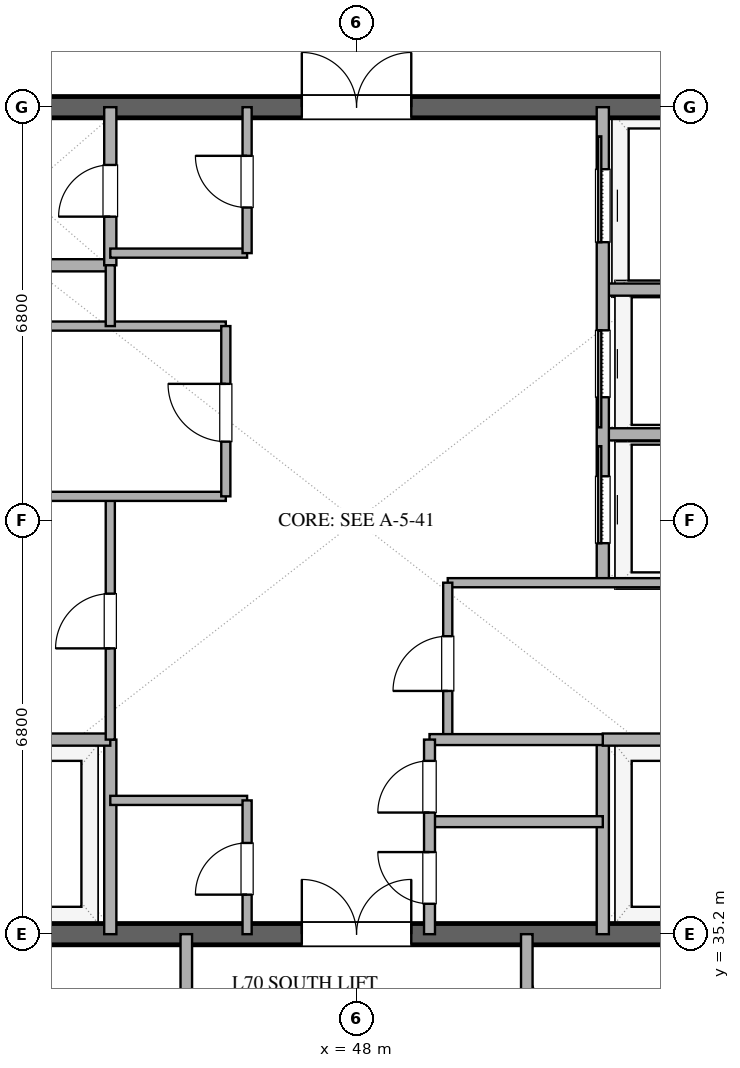
"""IFC4 building model, lengths in metres.
Left out: names, types, materials, properties, quantities, classifications, styles, units other than length and angle.
Written with IfcOpenShell. Run it as: python <this file> out.ifc"""

import sys

from ifc_helpers import new_model, si_unit, direction, frame, frame_2d, origin, place, context, subcontext, project, spatial, rectangle, extrude, element, fill, save


model = new_model("IFC4")
c1 = context("Model", 3, precision=1e-05, world=origin(), true_north=direction((0.0, 1.0)))
c2 = subcontext(c1, "Body", "Model", "MODEL_VIEW")
j1 = project(units=[si_unit("LENGTHUNIT", "METRE"), si_unit("PLANEANGLEUNIT", "RADIAN")], contexts=[c1])
p1 = place(None, origin())
s1 = spatial("IfcSite", under=j1, at=p1, CompositionType="ELEMENT")
p2 = place(p1, origin())
s2 = spatial("IfcBuilding", under=s1, at=p2, CompositionType="ELEMENT")
p3 = place(p2, frame((0.0, 0.0, 273.0)))
s3 = spatial("IfcBuildingStorey", under=s2, at=p3, CompositionType="ELEMENT", Elevation=273.0)
p4 = place(p3, frame((41.0, 35.2, 0.0), z_axis=(0.0, 0.0, 1.0), x_axis=(1.0, 0.0, 0.0)))
e1 = element("IfcWall", 1, at=p4, inside=s3, PredefinedType="SHEAR", context=c2, shape_type="SweptSolid", body=[
    extrude(rectangle(XDim=14.0, YDim=0.35, at=frame_2d((7.0, 0.0))), origin(), (0.0, 0.0, 1.0), 3.37),
])
p5 = place(p4, frame((6.1, 0.0, 0.0)))
e2 = element("IfcOpeningElement", 2, at=p5, cuts=e1, PredefinedType="OPENING", context=c2, shape_type="SweptSolid", body=[
    extrude(rectangle(XDim=1.8, YDim=2.25, at=frame_2d((0.9, 1.125))), frame((0.0, 0.185, 0.0), z_axis=(0.0, -1.0, 0.0), x_axis=(1.0, 0.0, 0.0)), (0.0, 0.0, 1.0), 0.37),
])
p6 = place(p3, frame((41.0, 48.8, 0.0), z_axis=(0.0, 0.0, 1.0), x_axis=(1.0, 0.0, 0.0)))
e3 = element("IfcWall", 3, at=p6, inside=s3, PredefinedType="SHEAR", context=c2, shape_type="SweptSolid", body=[
    extrude(rectangle(XDim=14.0, YDim=0.35, at=frame_2d((7.0, 0.0))), origin(), (0.0, 0.0, 1.0), 3.37),
])
p7 = place(p6, frame((6.1, 0.0, 0.0)))
e4 = element("IfcOpeningElement", 4, at=p7, cuts=e3, PredefinedType="OPENING", context=c2, shape_type="SweptSolid", body=[
    extrude(rectangle(XDim=1.8, YDim=2.25, at=frame_2d((0.9, 1.125))), frame((0.0, 0.185, 0.0), z_axis=(0.0, -1.0, 0.0), x_axis=(1.0, 0.0, 0.0)), (0.0, 0.0, 1.0), 0.37),
])
p8 = place(p3, frame((43.95, 35.2, 0.0), z_axis=(0.0, 0.0, 1.0), x_axis=(0.0, 1.0, 0.0)))
e5 = element("IfcWall", 5, at=p8, inside=s3, PredefinedType="SOLIDWALL", context=c2, shape_type="SweptSolid", body=[
    extrude(rectangle(XDim=3.2, YDim=0.2, at=frame_2d((1.6, 0.0))), origin(), (0.0, 0.0, 1.0), 2.73),
])
p9 = place(p3, frame((41.0, 38.4, 0.0), z_axis=(0.0, 0.0, 1.0), x_axis=(1.0, 0.0, 0.0)))
e6 = element("IfcWall", 6, at=p9, inside=s3, PredefinedType="SOLIDWALL", context=c2, shape_type="SweptSolid", body=[
    extrude(rectangle(XDim=2.95, YDim=0.2, at=frame_2d((1.475, 0.0))), origin(), (0.0, 0.0, 1.0), 2.73),
])
p10 = place(p3, frame((52.05, 35.2, 0.0), z_axis=(0.0, 0.0, 1.0), x_axis=(0.0, 1.0, 0.0)))
e7 = element("IfcWall", 7, at=p10, inside=s3, PredefinedType="SOLIDWALL", context=c2, shape_type="SweptSolid", body=[
    extrude(rectangle(XDim=3.2, YDim=0.2, at=frame_2d((1.6, 0.0))), origin(), (0.0, 0.0, 1.0), 2.73),
])
for number, where, z_axis, x_axis in (
    (8, (52.05, 38.4, 0.0), (0.0, 0.0, 1.0), (1.0, 0.0, 0.0)),
    (9, (41.0, 46.2, 0.0), (0.0, 0.0, 1.0), (1.0, 0.0, 0.0)),
):
    element("IfcWall", number, at=place(p3, frame(where, z_axis=z_axis, x_axis=x_axis)), inside=s3, PredefinedType="SOLIDWALL", context=c2, shape_type="SweptSolid", body=[
        extrude(rectangle(XDim=2.95, YDim=0.2, at=frame_2d((1.475, 0.0))), origin(), (0.0, 0.0, 1.0), 2.73),
    ])
p11 = place(p3, frame((43.95, 46.2, 0.0), z_axis=(0.0, 0.0, 1.0), x_axis=(0.0, 1.0, 0.0)))
e10 = element("IfcWall", 10, at=p11, inside=s3, PredefinedType="SOLIDWALL", context=c2, shape_type="SweptSolid", body=[
    extrude(rectangle(XDim=2.6, YDim=0.2, at=frame_2d((1.3, 0.0))), origin(), (0.0, 0.0, 1.0), 2.73),
])
p12 = place(p11, frame((0.8, 0.0, 0.0)))
e11 = element("IfcOpeningElement", 11, at=p12, cuts=e10, PredefinedType="OPENING", context=c2, shape_type="SweptSolid", body=[
    extrude(rectangle(XDim=0.85, YDim=2.15, at=frame_2d((0.425, 1.075))), frame((0.0, 0.11, 0.0), z_axis=(0.0, -1.0, 0.0), x_axis=(1.0, 0.0, 0.0)), (0.0, 0.0, 1.0), 0.22),
])
p13 = place(p3, frame((43.95, 38.4, 0.0), z_axis=(0.0, 0.0, 1.0), x_axis=(0.0, 1.0, 0.0)))
e12 = element("IfcWall", 12, at=p13, inside=s3, PredefinedType="PARTITIONING", context=c2, shape_type="SweptSolid", body=[
    extrude(rectangle(XDim=4.0, YDim=0.15, at=frame_2d((2.0, 0.0))), origin(), (0.0, 0.0, 1.0), 2.73),
])
p14 = place(p13, frame((1.5, 0.0, 0.0)))
e13 = element("IfcOpeningElement", 13, at=p14, cuts=e12, PredefinedType="OPENING", context=c2, shape_type="SweptSolid", body=[
    extrude(rectangle(XDim=0.9, YDim=2.15, at=frame_2d((0.45, 1.075))), frame((0.0, 0.085, 0.0), z_axis=(0.0, -1.0, 0.0), x_axis=(1.0, 0.0, 0.0)), (0.0, 0.0, 1.0), 0.17),
])
for number, where, z_axis, x_axis in (
    (14, (41.0, 42.4, 0.0), (0.0, 0.0, 1.0), (1.0, 0.0, 0.0)),
    (15, (41.0, 45.2, 0.0), (0.0, 0.0, 1.0), (1.0, 0.0, 0.0)),
):
    element("IfcWall", number, at=place(p3, frame(where, z_axis=z_axis, x_axis=x_axis)), inside=s3, PredefinedType="PARTITIONING", context=c2, shape_type="SweptSolid", body=[
        extrude(rectangle(XDim=4.85, YDim=0.15, at=frame_2d((2.425, 0.0))), origin(), (0.0, 0.0, 1.0), 2.73),
    ])
p15 = place(p3, frame((43.95, 45.2, 0.0), z_axis=(0.0, 0.0, 1.0), x_axis=(0.0, 1.0, 0.0)))
e16 = element("IfcWall", 16, at=p15, inside=s3, PredefinedType="PARTITIONING", context=c2, shape_type="SweptSolid", body=[
    extrude(rectangle(XDim=1.0, YDim=0.15, at=frame_2d((0.5, 0.0))), origin(), (0.0, 0.0, 1.0), 2.73),
])
p16 = place(p3, frame((45.85, 42.4, 0.0), z_axis=(0.0, 0.0, 1.0), x_axis=(0.0, 1.0, 0.0)))
e17 = element("IfcWall", 17, at=p16, inside=s3, PredefinedType="PARTITIONING", context=c2, shape_type="SweptSolid", body=[
    extrude(rectangle(XDim=2.8, YDim=0.15, at=frame_2d((1.4, 0.0))), origin(), (0.0, 0.0, 1.0), 2.73),
])
p17 = place(p16, frame((0.9, 0.0, 0.0)))
e18 = element("IfcOpeningElement", 18, at=p17, cuts=e17, PredefinedType="OPENING", context=c2, shape_type="SweptSolid", body=[
    extrude(rectangle(XDim=0.95, YDim=2.15, at=frame_2d((0.475, 1.075))), frame((0.0, 0.085, 0.0), z_axis=(0.0, -1.0, 0.0), x_axis=(1.0, 0.0, 0.0)), (0.0, 0.0, 1.0), 0.17),
])
for number, where, z_axis, x_axis in (
    (19, (52.05, 43.42, 0.0), (0.0, 0.0, 1.0), (1.0, 0.0, 0.0)),
    (20, (52.05, 45.8, 0.0), (0.0, 0.0, 1.0), (1.0, 0.0, 0.0)),
):
    element("IfcWall", number, at=place(p3, frame(where, z_axis=z_axis, x_axis=x_axis)), inside=s3, PredefinedType="SOLIDWALL", context=c2, shape_type="SweptSolid", body=[
        extrude(rectangle(XDim=2.95, YDim=0.2, at=frame_2d((1.475, 0.0))), origin(), (0.0, 0.0, 1.0), 2.73),
    ])
p18 = place(p3, frame((52.05, 40.98, 0.0), z_axis=(0.0, 0.0, 1.0), x_axis=(0.0, 1.0, 0.0)))
e21 = element("IfcWall", 21, at=p18, inside=s3, PredefinedType="SOLIDWALL", context=c2, shape_type="SweptSolid", body=[
    extrude(rectangle(XDim=7.82, YDim=0.2, at=frame_2d((3.91, 0.0))), origin(), (0.0, 0.0, 1.0), 2.73),
])
p19 = place(p18, frame((0.65, 0.0, 0.0)))
e22 = element("IfcOpeningElement", 22, at=p19, cuts=e21, PredefinedType="OPENING", context=c2, shape_type="SweptSolid", body=[
    extrude(rectangle(XDim=1.1, YDim=2.2, at=frame_2d((0.55, 1.1))), frame((0.0, 0.11, 0.0), z_axis=(0.0, -1.0, 0.0), x_axis=(1.0, 0.0, 0.0)), (0.0, 0.0, 1.0), 0.22),
])
p20 = place(p18, frame((3.05, 0.0, 0.0)))
e23 = element("IfcOpeningElement", 23, at=p20, cuts=e21, PredefinedType="OPENING", context=c2, shape_type="SweptSolid", body=[
    extrude(rectangle(XDim=1.1, YDim=2.2, at=frame_2d((0.55, 1.1))), frame((0.0, 0.11, 0.0), z_axis=(0.0, -1.0, 0.0), x_axis=(1.0, 0.0, 0.0)), (0.0, 0.0, 1.0), 0.22),
])
p21 = place(p18, frame((5.6, 0.0, 0.0)))
e24 = element("IfcOpeningElement", 24, at=p21, cuts=e21, PredefinedType="OPENING", context=c2, shape_type="SweptSolid", body=[
    extrude(rectangle(XDim=1.2, YDim=2.2, at=frame_2d((0.6, 1.1))), frame((0.0, 0.11, 0.0), z_axis=(0.0, -1.0, 0.0), x_axis=(1.0, 0.0, 0.0)), (0.0, 0.0, 1.0), 0.22),
])
p22 = place(p3, frame((49.5, 40.98, 0.0), z_axis=(0.0, 0.0, 1.0), x_axis=(1.0, 0.0, 0.0)))
e25 = element("IfcWall", 25, at=p22, inside=s3, PredefinedType="PARTITIONING", context=c2, shape_type="SweptSolid", body=[
    extrude(rectangle(XDim=5.5, YDim=0.15, at=frame_2d((2.75, 0.0))), origin(), (0.0, 0.0, 1.0), 2.73),
])
p23 = place(p3, frame((49.5, 38.4, 0.0), z_axis=(0.0, 0.0, 1.0), x_axis=(0.0, 1.0, 0.0)))
e26 = element("IfcWall", 26, at=p23, inside=s3, PredefinedType="PARTITIONING", context=c2, shape_type="SweptSolid", body=[
    extrude(rectangle(XDim=2.58, YDim=0.15, at=frame_2d((1.29, 0.0))), origin(), (0.0, 0.0, 1.0), 2.73),
])
p24 = place(p23, frame((0.8, 0.0, 0.0)))
e27 = element("IfcOpeningElement", 27, at=p24, cuts=e26, PredefinedType="OPENING", context=c2, shape_type="SweptSolid", body=[
    extrude(rectangle(XDim=0.9, YDim=2.15, at=frame_2d((0.45, 1.075))), frame((0.0, 0.085, 0.0), z_axis=(0.0, -1.0, 0.0), x_axis=(1.0, 0.0, 0.0)), (0.0, 0.0, 1.0), 0.17),
])
p25 = place(p3, frame((43.95, 37.4, 0.0), z_axis=(0.0, 0.0, 1.0), x_axis=(1.0, 0.0, 0.0)))
e28 = element("IfcWall", 28, at=p25, inside=s3, PredefinedType="PARTITIONING", context=c2, shape_type="SweptSolid", body=[
    extrude(rectangle(XDim=2.25, YDim=0.15, at=frame_2d((1.125, 0.0))), origin(), (0.0, 0.0, 1.0), 2.73),
])
p26 = place(p3, frame((46.2, 35.2, 0.0), z_axis=(0.0, 0.0, 1.0), x_axis=(0.0, 1.0, 0.0)))
e29 = element("IfcWall", 29, at=p26, inside=s3, PredefinedType="PARTITIONING", context=c2, shape_type="SweptSolid", body=[
    extrude(rectangle(XDim=2.2, YDim=0.15, at=frame_2d((1.1, 0.0))), origin(), (0.0, 0.0, 1.0), 2.73),
])
p27 = place(p26, frame((0.65, 0.0, 0.0)))
e30 = element("IfcOpeningElement", 30, at=p27, cuts=e29, PredefinedType="OPENING", context=c2, shape_type="SweptSolid", body=[
    extrude(rectangle(XDim=0.85, YDim=2.15, at=frame_2d((0.425, 1.075))), frame((0.0, 0.085, 0.0), z_axis=(0.0, -1.0, 0.0), x_axis=(1.0, 0.0, 0.0)), (0.0, 0.0, 1.0), 0.17),
])
p28 = place(p3, frame((43.95, 46.4, 0.0), z_axis=(0.0, 0.0, 1.0), x_axis=(1.0, 0.0, 0.0)))
e31 = element("IfcWall", 31, at=p28, inside=s3, PredefinedType="PARTITIONING", context=c2, shape_type="SweptSolid", body=[
    extrude(rectangle(XDim=2.25, YDim=0.15, at=frame_2d((1.125, 0.0))), origin(), (0.0, 0.0, 1.0), 2.73),
])
p29 = place(p3, frame((46.2, 46.4, 0.0), z_axis=(0.0, 0.0, 1.0), x_axis=(0.0, 1.0, 0.0)))
e32 = element("IfcWall", 32, at=p29, inside=s3, PredefinedType="PARTITIONING", context=c2, shape_type="SweptSolid", body=[
    extrude(rectangle(XDim=2.4, YDim=0.15, at=frame_2d((1.2, 0.0))), origin(), (0.0, 0.0, 1.0), 2.73),
])
p30 = place(p29, frame((0.75, 0.0, 0.0)))
e33 = element("IfcOpeningElement", 33, at=p30, cuts=e32, PredefinedType="OPENING", context=c2, shape_type="SweptSolid", body=[
    extrude(rectangle(XDim=0.85, YDim=2.15, at=frame_2d((0.425, 1.075))), frame((0.0, 0.085, 0.0), z_axis=(0.0, -1.0, 0.0), x_axis=(1.0, 0.0, 0.0)), (0.0, 0.0, 1.0), 0.17),
])
for number, where, z_axis, x_axis in (
    (34, (49.2, 37.05, 0.0), (0.0, 0.0, 1.0), (1.0, 0.0, 0.0)),
    (35, (49.2, 38.4, 0.0), (0.0, 0.0, 1.0), (1.0, 0.0, 0.0)),
):
    element("IfcWall", number, at=place(p3, frame(where, z_axis=z_axis, x_axis=x_axis)), inside=s3, PredefinedType="PLUMBINGWALL", context=c2, shape_type="SweptSolid", body=[
        extrude(rectangle(XDim=2.85, YDim=0.18, at=frame_2d((1.425, 0.0))), origin(), (0.0, 0.0, 1.0), 2.73),
    ])
p31 = place(p3, frame((49.2, 35.2, 0.0), z_axis=(0.0, 0.0, 1.0), x_axis=(0.0, 1.0, 0.0)))
e36 = element("IfcWall", 36, at=p31, inside=s3, PredefinedType="PLUMBINGWALL", context=c2, shape_type="SweptSolid", body=[
    extrude(rectangle(XDim=3.2, YDim=0.18, at=frame_2d((1.6, 0.0))), origin(), (0.0, 0.0, 1.0), 2.73),
])
p32 = place(p31, frame((0.5, 0.0, 0.0)))
e37 = element("IfcOpeningElement", 37, at=p32, cuts=e36, PredefinedType="OPENING", context=c2, shape_type="SweptSolid", body=[
    extrude(rectangle(XDim=0.85, YDim=2.1, at=frame_2d((0.425, 1.05))), frame((0.0, 0.1, 0.0), z_axis=(0.0, -1.0, 0.0), x_axis=(1.0, 0.0, 0.0)), (0.0, 0.0, 1.0), 0.2),
])
p33 = place(p31, frame((2.0, 0.0, 0.0)))
e38 = element("IfcOpeningElement", 38, at=p33, cuts=e36, PredefinedType="OPENING", context=c2, shape_type="SweptSolid", body=[
    extrude(rectangle(XDim=0.85, YDim=2.15, at=frame_2d((0.425, 1.075))), frame((0.0, 0.1, 0.0), z_axis=(0.0, -1.0, 0.0), x_axis=(1.0, 0.0, 0.0)), (0.0, 0.0, 1.0), 0.2),
])
p34 = place(p3, frame((50.8, 34.307, 0.0), z_axis=(0.0, 0.0, 1.0), x_axis=(0.342010724278, -0.939696048985, 0.0)))
e39 = element("IfcWall", 39, at=p34, inside=s3, PredefinedType="PARTITIONING", context=c2, shape_type="SweptSolid", body=[
    extrude(rectangle(XDim=8.568, YDim=0.2, at=frame_2d((4.284, 0.0))), origin(), (0.0, 0.0, 1.0), 2.73),
])
for number, where, z_axis, x_axis in (
    (40, (45.2, 33.1, 0.0), (0.0, 0.0, 1.0), (0.0, 1.0, 0.0)),
    (41, (50.8, 35.2, 0.0), (0.0, 0.0, 1.0), (0.0, -1.0, 0.0)),
):
    element("IfcWall", number, at=place(p3, frame(where, z_axis=z_axis, x_axis=x_axis)), inside=s3, PredefinedType="PARTITIONING", context=c2, shape_type="SweptSolid", body=[
        extrude(rectangle(XDim=2.1, YDim=0.19, at=frame_2d((1.05, 0.0))), origin(), (0.0, 0.0, 1.0), 2.73),
    ])
p35 = place(p5, origin())
e42 = element("IfcDoor", 42, at=p35, inside=s3, OperationType="DOUBLE_DOOR_SINGLE_SWING", PredefinedType="DOOR", context=c2, shape_type="SweptSolid", body=[
    extrude(rectangle(XDim=1.8, YDim=2.25, at=frame_2d((0.9, 1.125))), frame((0.0, 0.025, 0.0), z_axis=(0.0, -1.0, 0.0), x_axis=(1.0, 0.0, 0.0)), (0.0, 0.0, 1.0), 0.05),
])
fill(e2, e42)
p36 = place(p7, origin())
e43 = element("IfcDoor", 43, at=p36, inside=s3, OperationType="DOUBLE_DOOR_SINGLE_SWING", PredefinedType="DOOR", context=c2, shape_type="SweptSolid", body=[
    extrude(rectangle(XDim=1.8, YDim=2.25, at=frame_2d((0.9, 1.125))), frame((0.0, 0.025, 0.0), z_axis=(0.0, -1.0, 0.0), x_axis=(1.0, 0.0, 0.0)), (0.0, 0.0, 1.0), 0.05),
])
fill(e4, e43)
p37 = place(p12, origin())
e44 = element("IfcDoor", 44, at=p37, inside=s3, OperationType="SINGLE_SWING_LEFT", PredefinedType="DOOR", context=c2, shape_type="SweptSolid", body=[
    extrude(rectangle(XDim=0.85, YDim=2.15, at=frame_2d((0.425, 1.075))), frame((0.0, 0.025, 0.0), z_axis=(0.0, -1.0, 0.0), x_axis=(1.0, 0.0, 0.0)), (0.0, 0.0, 1.0), 0.05),
])
fill(e11, e44)
p38 = place(p14, origin())
e45 = element("IfcDoor", 45, at=p38, inside=s3, OperationType="SINGLE_SWING_LEFT", PredefinedType="DOOR", context=c2, shape_type="SweptSolid", body=[
    extrude(rectangle(XDim=0.9, YDim=2.15, at=frame_2d((0.45, 1.075))), frame((0.0, 0.025, 0.0), z_axis=(0.0, -1.0, 0.0), x_axis=(1.0, 0.0, 0.0)), (0.0, 0.0, 1.0), 0.05),
])
fill(e13, e45)
p39 = place(p17, origin())
e46 = element("IfcDoor", 46, at=p39, inside=s3, OperationType="SINGLE_SWING_RIGHT", PredefinedType="DOOR", context=c2, shape_type="SweptSolid", body=[
    extrude(rectangle(XDim=0.95, YDim=2.15, at=frame_2d((0.475, 1.075))), frame((0.0, 0.025, 0.0), z_axis=(0.0, -1.0, 0.0), x_axis=(1.0, 0.0, 0.0)), (0.0, 0.0, 1.0), 0.05),
])
fill(e18, e46)
p40 = place(p19, origin())
e47 = element("IfcDoor", 47, at=p40, inside=s3, OperationType="SLIDING_TO_RIGHT", PredefinedType="DOOR", context=c2, shape_type="SweptSolid", body=[
    extrude(rectangle(XDim=1.1, YDim=2.2, at=frame_2d((0.55, 1.1))), frame((0.0, 0.025, 0.0), z_axis=(0.0, -1.0, 0.0), x_axis=(1.0, 0.0, 0.0)), (0.0, 0.0, 1.0), 0.05),
])
fill(e22, e47)
p41 = place(p20, origin())
e48 = element("IfcDoor", 48, at=p41, inside=s3, OperationType="SLIDING_TO_LEFT", PredefinedType="DOOR", context=c2, shape_type="SweptSolid", body=[
    extrude(rectangle(XDim=1.1, YDim=2.2, at=frame_2d((0.55, 1.1))), frame((0.0, 0.025, 0.0), z_axis=(0.0, -1.0, 0.0), x_axis=(1.0, 0.0, 0.0)), (0.0, 0.0, 1.0), 0.05),
])
fill(e23, e48)
p42 = place(p21, origin())
e49 = element("IfcDoor", 49, at=p42, inside=s3, OperationType="SLIDING_TO_RIGHT", PredefinedType="DOOR", context=c2, shape_type="SweptSolid", body=[
    extrude(rectangle(XDim=1.2, YDim=2.2, at=frame_2d((0.6, 1.1))), frame((0.0, 0.025, 0.0), z_axis=(0.0, -1.0, 0.0), x_axis=(1.0, 0.0, 0.0)), (0.0, 0.0, 1.0), 0.05),
])
fill(e24, e49)
p43 = place(p24, origin())
e50 = element("IfcDoor", 50, at=p43, inside=s3, OperationType="SINGLE_SWING_LEFT", PredefinedType="DOOR", context=c2, shape_type="SweptSolid", body=[
    extrude(rectangle(XDim=0.9, YDim=2.15, at=frame_2d((0.45, 1.075))), frame((0.0, 0.025, 0.0), z_axis=(0.0, -1.0, 0.0), x_axis=(1.0, 0.0, 0.0)), (0.0, 0.0, 1.0), 0.05),
])
fill(e27, e50)
p44 = place(p27, origin())
e51 = element("IfcDoor", 51, at=p44, inside=s3, OperationType="SINGLE_SWING_LEFT", PredefinedType="DOOR", context=c2, shape_type="SweptSolid", body=[
    extrude(rectangle(XDim=0.85, YDim=2.15, at=frame_2d((0.425, 1.075))), frame((0.0, 0.025, 0.0), z_axis=(0.0, -1.0, 0.0), x_axis=(1.0, 0.0, 0.0)), (0.0, 0.0, 1.0), 0.05),
])
fill(e30, e51)
p45 = place(p30, origin())
e52 = element("IfcDoor", 52, at=p45, inside=s3, OperationType="SINGLE_SWING_RIGHT", PredefinedType="DOOR", context=c2, shape_type="SweptSolid", body=[
    extrude(rectangle(XDim=0.85, YDim=2.15, at=frame_2d((0.425, 1.075))), frame((0.0, 0.025, 0.0), z_axis=(0.0, -1.0, 0.0), x_axis=(1.0, 0.0, 0.0)), (0.0, 0.0, 1.0), 0.05),
])
fill(e33, e52)
p46 = place(p32, origin())
e53 = element("IfcDoor", 53, at=p46, inside=s3, OperationType="SINGLE_SWING_RIGHT", PredefinedType="DOOR", context=c2, shape_type="SweptSolid", body=[
    extrude(rectangle(XDim=0.85, YDim=2.1, at=frame_2d((0.425, 1.05))), frame((0.0, 0.025, 0.0), z_axis=(0.0, -1.0, 0.0), x_axis=(1.0, 0.0, 0.0)), (0.0, 0.0, 1.0), 0.05),
])
fill(e37, e53)
p47 = place(p33, origin())
e54 = element("IfcDoor", 54, at=p47, inside=s3, OperationType="SINGLE_SWING_LEFT", PredefinedType="DOOR", context=c2, shape_type="SweptSolid", body=[
    extrude(rectangle(XDim=0.85, YDim=2.15, at=frame_2d((0.425, 1.075))), frame((0.0, 0.025, 0.0), z_axis=(0.0, -1.0, 0.0), x_axis=(1.0, 0.0, 0.0)), (0.0, 0.0, 1.0), 0.05),
])
fill(e38, e54)
save(model, sys.argv[1])
